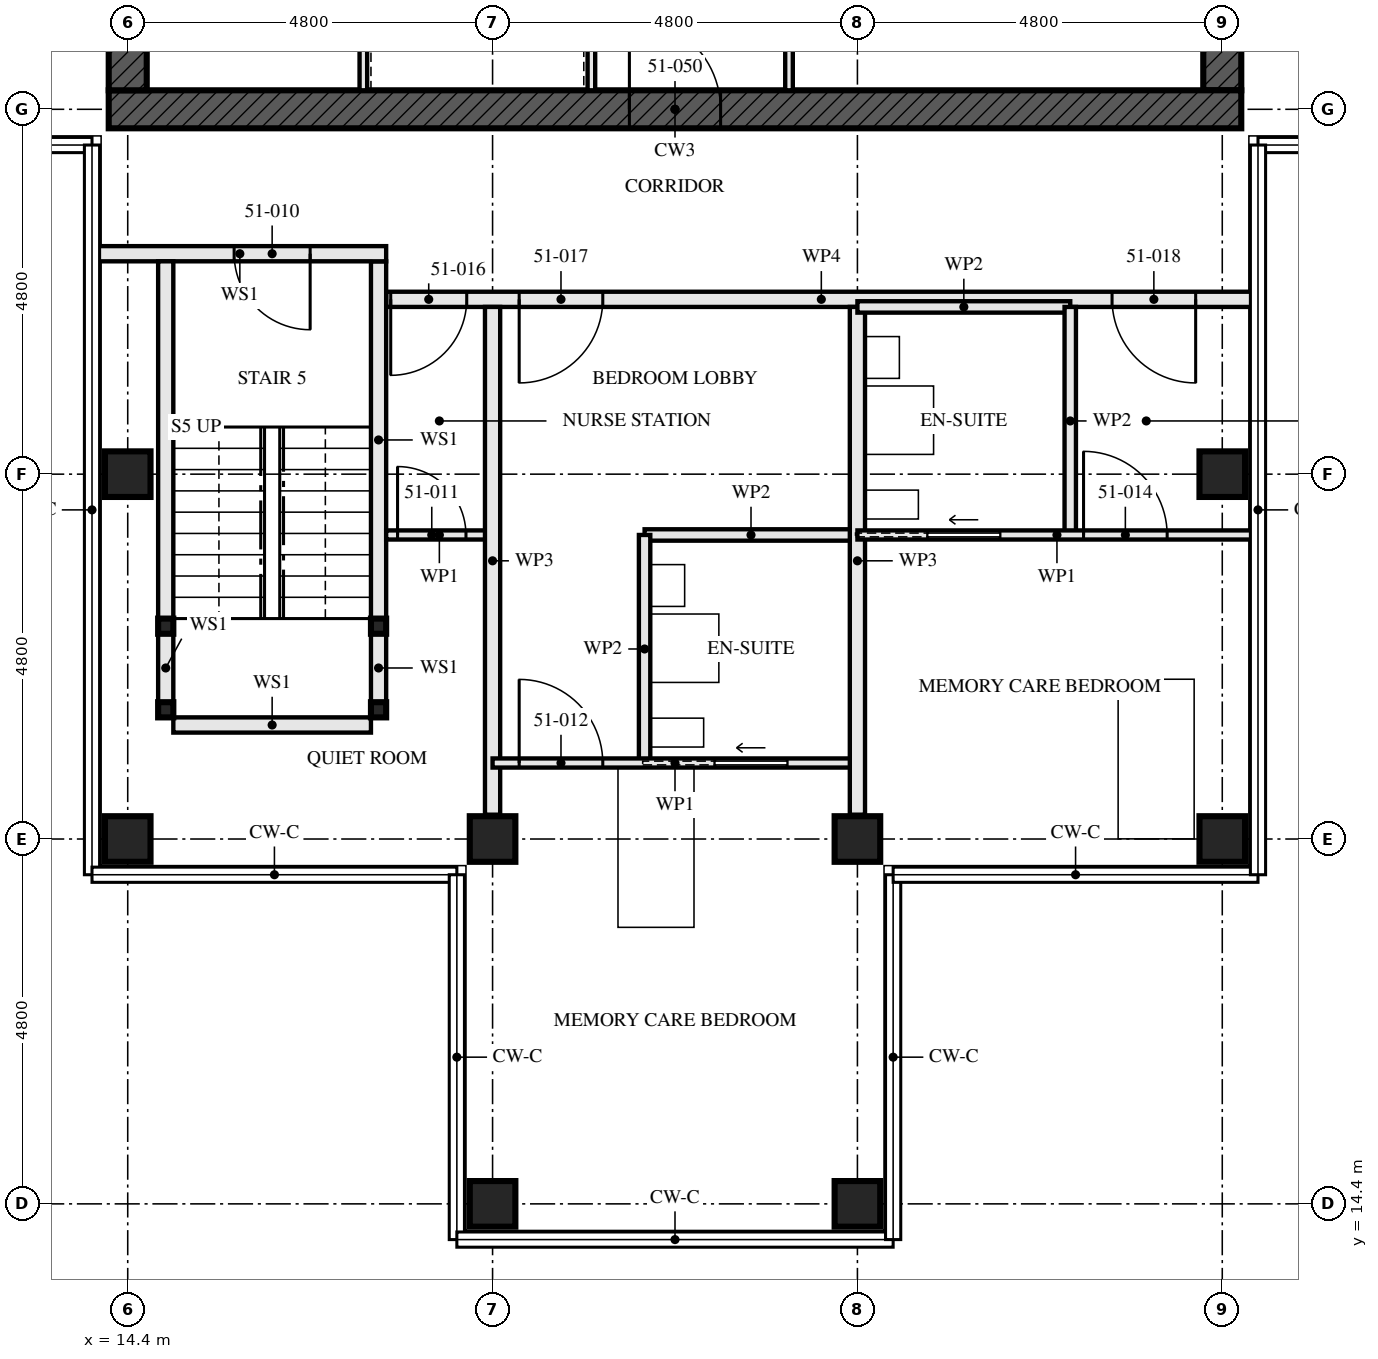
"""IFC4 building model, lengths in metres.
Left out: names, types, materials, properties, quantities, classifications, styles, units other than length and angle.
Written with IfcOpenShell. Run it as: python <this file> out.ifc"""

import sys

from ifc_helpers import new_model, si_unit, direction, frame, frame_2d, origin, origin_2d, place, context, subcontext, project, spatial, rectangle, hollow_rectangle, extrude, element, fill, save


model = new_model("IFC4")
c1 = context("Model", 3, precision=1e-05, world=origin(), true_north=direction((0.0, 1.0)))
c2 = subcontext(c1, "Body", "Model", "MODEL_VIEW")
j1 = project(units=[si_unit("LENGTHUNIT", "METRE"), si_unit("PLANEANGLEUNIT", "RADIAN")], contexts=[c1])
p1 = place(None, origin())
s1 = spatial("IfcSite", under=j1, at=p1, CompositionType="ELEMENT")
p2 = place(p1, origin())
s2 = spatial("IfcBuilding", under=s1, at=p2, CompositionType="ELEMENT")
p3 = place(p2, frame((0.0, 0.0, 186.5)))
s3 = spatial("IfcBuildingStorey", under=s2, at=p3, CompositionType="ELEMENT", Elevation=186.5)
for number, where, z_axis, x_axis in (
    (1, (14.4, 19.2, 0.0), (0.0, 0.0, 1.0), (0.0, 1.0, 0.0)),
    (2, (14.4, 24.0, 0.0), (0.0, 0.0, 1.0), (1.0, 0.0, 0.0)),
    (3, (19.2, 14.4, 0.0), (0.0, 0.0, 1.0), (0.0, 1.0, 0.0)),
    (4, (19.2, 19.2, 0.0), (0.0, 0.0, 1.0), (0.0, 1.0, 0.0)),
    (5, (24.0, 14.4, 0.0), (0.0, 0.0, 1.0), (0.0, 1.0, 0.0)),
    (6, (24.0, 19.2, 0.0), (0.0, 0.0, 1.0), (0.0, 1.0, 0.0)),
    (7, (28.8, 19.2, 0.0), (0.0, 0.0, 1.0), (0.0, 1.0, 0.0)),
    (8, (28.8, 24.0, 0.0), (0.0, 0.0, 1.0), (1.0, 0.0, 0.0)),
):
    element("IfcColumn", number, at=place(p3, frame(where, z_axis=z_axis, x_axis=x_axis)), inside=s3, PredefinedType="COLUMN", context=c2, shape_type="SweptSolid", body=[
        extrude(hollow_rectangle(XDim=0.6, YDim=0.6, WallThickness=0.08, at=origin_2d()), origin(), (0.0, 0.0, 1.0), 3.5),
    ])
p4 = place(p3, frame((14.15, 28.8, -0.17), z_axis=(0.0, 0.0, 1.0), x_axis=(1.0, 0.0, 0.0)))
e9 = element("IfcWall", 9, at=p4, inside=s3, PredefinedType="SHEAR", context=c2, shape_type="SweptSolid", body=[
    extrude(rectangle(XDim=14.9, YDim=0.5, at=frame_2d((7.45, 0.0))), origin(), (0.0, 0.0, 1.0), 3.42),
])
p5 = place(p4, frame((6.85, 0.0, 0.17)))
e10 = element("IfcOpeningElement", 10, at=p5, cuts=e9, PredefinedType="OPENING", context=c2, shape_type="SweptSolid", body=[
    extrude(rectangle(XDim=1.2, YDim=2.1, at=frame_2d((0.6, 1.05))), frame((0.0, 0.26, 0.0), z_axis=(0.0, -1.0, 0.0), x_axis=(1.0, 0.0, 0.0)), (0.0, 0.0, 1.0), 0.521),
])
p6 = place(p3, frame((14.4, 42.95, -0.17), z_axis=(0.0, 0.0, 1.0), x_axis=(0.0, -1.0, 0.0)))
e11 = element("IfcWall", 11, at=p6, inside=s3, PredefinedType="SHEAR", context=c2, shape_type="SweptSolid", body=[
    extrude(rectangle(XDim=13.9, YDim=0.5, at=frame_2d((6.95, 0.0))), origin(), (0.0, 0.0, 1.0), 3.42),
])
p7 = place(p6, frame((6.35, 0.0, 0.17)))
e12 = element("IfcOpeningElement", 12, at=p7, cuts=e11, PredefinedType="OPENING", context=c2, shape_type="SweptSolid", body=[
    extrude(rectangle(XDim=1.2, YDim=2.1, at=frame_2d((0.6, 1.05))), frame((0.0, 0.26, 0.0), z_axis=(0.0, -1.0, 0.0), x_axis=(1.0, 0.0, 0.0)), (0.0, 0.0, 1.0), 0.521),
])
p8 = place(p3, frame((28.8, 29.05, -0.17), z_axis=(0.0, 0.0, 1.0), x_axis=(0.0, 1.0, 0.0)))
e13 = element("IfcWall", 13, at=p8, inside=s3, PredefinedType="SHEAR", context=c2, shape_type="SweptSolid", body=[
    extrude(rectangle(XDim=13.9, YDim=0.5, at=frame_2d((6.95, 0.0))), origin(), (0.0, 0.0, 1.0), 3.42),
])
p9 = place(p8, frame((6.35, 0.0, 0.17)))
e14 = element("IfcOpeningElement", 14, at=p9, cuts=e13, PredefinedType="OPENING", context=c2, shape_type="SweptSolid", body=[
    extrude(rectangle(XDim=1.2, YDim=2.1, at=frame_2d((0.6, 1.05))), frame((0.0, 0.26, 0.0), z_axis=(0.0, -1.0, 0.0), x_axis=(1.0, 0.0, 0.0)), (0.0, 0.0, 1.0), 0.521),
])
for number, where, z_axis, x_axis in (
    (15, (14.9, 20.9, 0.0), (0.0, 0.0, 1.0), (1.0, 0.0, 0.0)),
    (16, (17.7, 20.9, 0.0), (0.0, 0.0, 1.0), (1.0, 0.0, 0.0)),
    (17, (14.9, 22.0, 0.0), (0.0, 0.0, 1.0), (1.0, 0.0, 0.0)),
    (18, (17.7, 22.0, 0.0), (0.0, 0.0, 1.0), (1.0, 0.0, 0.0)),
):
    element("IfcColumn", number, at=place(p3, frame(where, z_axis=z_axis, x_axis=x_axis)), inside=s3, PredefinedType="COLUMN", context=c2, shape_type="SweptSolid", body=[
        extrude(hollow_rectangle(XDim=0.2, YDim=0.2, WallThickness=0.008, at=origin_2d()), origin(), (0.0, 0.0, 1.0), 3.25),
    ])
p10 = place(p3, frame((14.9, 21.0, 0.0), z_axis=(0.0, 0.0, 1.0), x_axis=(0.0, 1.0, 0.0)))
e19 = element("IfcWall", 19, at=p10, inside=s3, PredefinedType="SOLIDWALL", context=c2, shape_type="SweptSolid", body=[
    extrude(rectangle(XDim=0.9, YDim=0.2, at=frame_2d((0.45, 0.0))), origin(), (0.0, 0.0, 1.0), 2.94),
])
p11 = place(p3, frame((14.9, 22.1, 0.0), z_axis=(0.0, 0.0, 1.0), x_axis=(0.0, 1.0, 0.0)))
e20 = element("IfcWall", 20, at=p11, inside=s3, PredefinedType="SOLIDWALL", context=c2, shape_type="SweptSolid", body=[
    extrude(rectangle(XDim=4.7, YDim=0.2, at=frame_2d((2.35, 0.0))), origin(), (0.0, 0.0, 1.0), 2.94),
])
p12 = place(p3, frame((17.7, 21.0, 0.0), z_axis=(0.0, 0.0, 1.0), x_axis=(0.0, 1.0, 0.0)))
e21 = element("IfcWall", 21, at=p12, inside=s3, PredefinedType="SOLIDWALL", context=c2, shape_type="SweptSolid", body=[
    extrude(rectangle(XDim=0.9, YDim=0.2, at=frame_2d((0.45, 0.0))), origin(), (0.0, 0.0, 1.0), 2.94),
])
p13 = place(p3, frame((17.7, 22.1, 0.0), z_axis=(0.0, 0.0, 1.0), x_axis=(0.0, 1.0, 0.0)))
e22 = element("IfcWall", 22, at=p13, inside=s3, PredefinedType="SOLIDWALL", context=c2, shape_type="SweptSolid", body=[
    extrude(rectangle(XDim=4.7, YDim=0.2, at=frame_2d((2.35, 0.0))), origin(), (0.0, 0.0, 1.0), 2.94),
])
p14 = place(p3, frame((15.0, 20.7, 0.0), z_axis=(0.0, 0.0, 1.0), x_axis=(1.0, 0.0, 0.0)))
e23 = element("IfcWall", 23, at=p14, inside=s3, PredefinedType="SOLIDWALL", context=c2, shape_type="SweptSolid", body=[
    extrude(rectangle(XDim=2.6, YDim=0.2, at=frame_2d((1.3, 0.0))), origin(), (0.0, 0.0, 1.0), 3.25),
])
p15 = place(p3, frame((13.95, 26.9, 0.0), z_axis=(0.0, 0.0, 1.0), x_axis=(1.0, 0.0, 0.0)))
e24 = element("IfcWall", 24, at=p15, inside=s3, PredefinedType="SOLIDWALL", context=c2, shape_type="SweptSolid", body=[
    extrude(rectangle(XDim=3.85, YDim=0.2, at=frame_2d((1.925, 0.0))), origin(), (0.0, 0.0, 1.0), 2.04),
])
p16 = place(p15, frame((1.85, 0.0, 0.0)))
e25 = element("IfcOpeningElement", 25, at=p16, cuts=e24, PredefinedType="OPENING", context=c2, shape_type="SweptSolid", body=[
    extrude(rectangle(XDim=1.0, YDim=2.0, at=frame_2d((0.5, 1.0))), frame((0.0, 0.111, 0.0), z_axis=(0.0, -1.0, 0.0), x_axis=(1.0, 0.0, 0.0)), (0.0, 0.0, 1.0), 0.221),
])
p17 = place(p3, frame((17.8, 23.2, 0.0), z_axis=(0.0, 0.0, 1.0), x_axis=(1.0, 0.0, 0.0)))
e26 = element("IfcWall", 26, at=p17, inside=s3, PredefinedType="PARTITIONING", context=c2, shape_type="SweptSolid", body=[
    extrude(rectangle(XDim=1.4, YDim=0.12, at=frame_2d((0.7, 0.0))), origin(), (0.0, 0.0, 1.0), 3.25),
])
p18 = place(p17, frame((0.15, 0.0, 0.0)))
e27 = element("IfcOpeningElement", 27, at=p18, cuts=e26, PredefinedType="OPENING", context=c2, shape_type="SweptSolid", body=[
    extrude(rectangle(XDim=0.9, YDim=2.1, at=frame_2d((0.45, 1.05))), frame((0.0, 0.071, 0.0), z_axis=(0.0, -1.0, 0.0), x_axis=(1.0, 0.0, 0.0)), (0.0, 0.0, 1.0), 0.141),
])
p19 = place(p3, frame((19.2, 19.52, 0.0), z_axis=(0.0, 0.0, 1.0), x_axis=(0.0, 1.0, 0.0)))
e28 = element("IfcWall", 28, at=p19, inside=s3, PredefinedType="PARTITIONING", context=c2, shape_type="SweptSolid", body=[
    extrude(rectangle(XDim=6.68, YDim=0.2, at=frame_2d((3.34, 0.0))), origin(), (0.0, 0.0, 1.0), 2.04),
])
p20 = place(p3, frame((21.2, 20.2, 0.0), z_axis=(0.0, 0.0, 1.0), x_axis=(0.0, 1.0, 0.0)))
e29 = element("IfcWall", 29, at=p20, inside=s3, PredefinedType="PARTITIONING", context=c2, shape_type="SweptSolid", body=[
    extrude(rectangle(XDim=3.0, YDim=0.15, at=frame_2d((1.5, 0.0))), origin(), (0.0, 0.0, 1.0), 3.25),
])
p21 = place(p3, frame((21.2, 23.2, 0.0), z_axis=(0.0, 0.0, 1.0), x_axis=(1.0, 0.0, 0.0)))
e30 = element("IfcWall", 30, at=p21, inside=s3, PredefinedType="PARTITIONING", context=c2, shape_type="SweptSolid", body=[
    extrude(rectangle(XDim=2.8, YDim=0.15, at=frame_2d((1.4, 0.0))), origin(), (0.0, 0.0, 1.0), 3.25),
])
p22 = place(p3, frame((19.2, 20.2, 0.0), z_axis=(0.0, 0.0, 1.0), x_axis=(1.0, 0.0, 0.0)))
e31 = element("IfcWall", 31, at=p22, inside=s3, PredefinedType="PARTITIONING", context=c2, shape_type="SweptSolid", body=[
    extrude(rectangle(XDim=4.8, YDim=0.12, at=frame_2d((2.4, 0.0))), origin(), (0.0, 0.0, 1.0), 3.25),
])
p23 = place(p22, frame((0.35, 0.0, 0.0)))
e32 = element("IfcOpeningElement", 32, at=p23, cuts=e31, PredefinedType="OPENING", context=c2, shape_type="SweptSolid", body=[
    extrude(rectangle(XDim=1.1, YDim=2.1, at=frame_2d((0.55, 1.05))), frame((0.0, 0.071, 0.0), z_axis=(0.0, -1.0, 0.0), x_axis=(1.0, 0.0, 0.0)), (0.0, 0.0, 1.0), 0.141),
])
p24 = place(p22, frame((2.925, 0.0, 0.0)))
e33 = element("IfcOpeningElement", 33, at=p24, cuts=e31, PredefinedType="OPENING", context=c2, shape_type="SweptSolid", body=[
    extrude(rectangle(XDim=0.95, YDim=2.1, at=frame_2d((0.475, 1.05))), frame((0.0, 0.071, 0.0), z_axis=(0.0, -1.0, 0.0), x_axis=(1.0, 0.0, 0.0)), (0.0, 0.0, 1.0), 0.141),
])
p25 = place(p3, frame((24.0, 19.52, 0.0), z_axis=(0.0, 0.0, 1.0), x_axis=(0.0, 1.0, 0.0)))
e34 = element("IfcWall", 34, at=p25, inside=s3, PredefinedType="PARTITIONING", context=c2, shape_type="SweptSolid", body=[
    extrude(rectangle(XDim=6.68, YDim=0.2, at=frame_2d((3.34, 0.0))), origin(), (0.0, 0.0, 1.0), 2.04),
])
p26 = place(p3, frame((26.8, 23.2, 0.0), z_axis=(0.0, 0.0, 1.0), x_axis=(0.0, 1.0, 0.0)))
e35 = element("IfcWall", 35, at=p26, inside=s3, PredefinedType="PARTITIONING", context=c2, shape_type="SweptSolid", body=[
    extrude(rectangle(XDim=3.0, YDim=0.15, at=frame_2d((1.5, 0.0))), origin(), (0.0, 0.0, 1.0), 2.04),
])
p27 = place(p3, frame((24.0, 26.2, 0.0), z_axis=(0.0, 0.0, 1.0), x_axis=(1.0, 0.0, 0.0)))
e36 = element("IfcWall", 36, at=p27, inside=s3, PredefinedType="PARTITIONING", context=c2, shape_type="SweptSolid", body=[
    extrude(rectangle(XDim=2.8, YDim=0.15, at=frame_2d((1.4, 0.0))), origin(), (0.0, 0.0, 1.0), 3.25),
])
p28 = place(p3, frame((24.0, 23.2, 0.0), z_axis=(0.0, 0.0, 1.0), x_axis=(1.0, 0.0, 0.0)))
e37 = element("IfcWall", 37, at=p28, inside=s3, PredefinedType="PARTITIONING", context=c2, shape_type="SweptSolid", body=[
    extrude(rectangle(XDim=5.25, YDim=0.12, at=frame_2d((2.625, 0.0))), origin(), (0.0, 0.0, 1.0), 2.04),
])
p29 = place(p28, frame((2.975, 0.0, 0.0)))
e38 = element("IfcOpeningElement", 38, at=p29, cuts=e37, PredefinedType="OPENING", context=c2, shape_type="SweptSolid", body=[
    extrude(rectangle(XDim=1.1, YDim=2.0, at=frame_2d((0.55, 1.0))), frame((0.0, 0.071, 0.0), z_axis=(0.0, -1.0, 0.0), x_axis=(1.0, 0.0, 0.0)), (0.0, 0.0, 1.0), 0.141),
])
p30 = place(p28, frame((0.925, 0.0, 0.0)))
e39 = element("IfcOpeningElement", 39, at=p30, cuts=e37, PredefinedType="OPENING", context=c2, shape_type="SweptSolid", body=[
    extrude(rectangle(XDim=0.95, YDim=2.0, at=frame_2d((0.475, 1.0))), frame((0.0, 0.071, 0.0), z_axis=(0.0, -1.0, 0.0), x_axis=(1.0, 0.0, 0.0)), (0.0, 0.0, 1.0), 0.141),
])
p31 = place(p3, frame((17.8, 26.3, 0.0), z_axis=(0.0, 0.0, 1.0), x_axis=(1.0, 0.0, 0.0)))
e40 = element("IfcWall", 40, at=p31, inside=s3, PredefinedType="PARTITIONING", context=c2, shape_type="SweptSolid", body=[
    extrude(rectangle(XDim=11.45, YDim=0.2, at=frame_2d((5.725, 0.0))), origin(), (0.0, 0.0, 1.0), 2.04),
])
p32 = place(p31, frame((0.06, 0.0, 0.0)))
e41 = element("IfcOpeningElement", 41, at=p32, cuts=e40, PredefinedType="OPENING", context=c2, shape_type="SweptSolid", body=[
    extrude(rectangle(XDim=1.0, YDim=2.0, at=frame_2d((0.5, 1.0))), frame((0.0, 0.111, 0.0), z_axis=(0.0, -1.0, 0.0), x_axis=(1.0, 0.0, 0.0)), (0.0, 0.0, 1.0), 0.221),
])
p33 = place(p31, frame((1.75, 0.0, 0.0)))
e42 = element("IfcOpeningElement", 42, at=p33, cuts=e40, PredefinedType="OPENING", context=c2, shape_type="SweptSolid", body=[
    extrude(rectangle(XDim=1.1, YDim=2.0, at=frame_2d((0.55, 1.0))), frame((0.0, 0.111, 0.0), z_axis=(0.0, -1.0, 0.0), x_axis=(1.0, 0.0, 0.0)), (0.0, 0.0, 1.0), 0.221),
])
p34 = place(p31, frame((9.55, 0.0, 0.0)))
e43 = element("IfcOpeningElement", 43, at=p34, cuts=e40, PredefinedType="OPENING", context=c2, shape_type="SweptSolid", body=[
    extrude(rectangle(XDim=1.1, YDim=2.0, at=frame_2d((0.55, 1.0))), frame((0.0, 0.111, 0.0), z_axis=(0.0, -1.0, 0.0), x_axis=(1.0, 0.0, 0.0)), (0.0, 0.0, 1.0), 0.221),
])
p35 = place(p3, frame((20.5, 29.05, 0.0), z_axis=(0.0, 0.0, 1.0), x_axis=(0.0, 1.0, 0.0)))
e44 = element("IfcWall", 44, at=p35, inside=s3, PredefinedType="SOLIDWALL", context=c2, shape_type="SweptSolid", body=[
    extrude(rectangle(XDim=5.8, YDim=0.1, at=frame_2d((2.9, 0.0))), origin(), (0.0, 0.0, 1.0), 3.25),
])
p36 = place(p35, frame((0.8, 0.0, 0.0)))
e45 = element("IfcOpeningElement", 45, at=p36, cuts=e44, PredefinedType="OPENING", context=c2, shape_type="SweptSolid", body=[
    extrude(rectangle(XDim=1.1, YDim=2.3, at=frame_2d((0.55, 1.15))), frame((0.0, 0.061, 0.0), z_axis=(0.0, -1.0, 0.0), x_axis=(1.0, 0.0, 0.0)), (0.0, 0.0, 1.0), 0.121),
])
p37 = place(p35, frame((3.775, 0.0, 0.0)))
e46 = element("IfcOpeningElement", 46, at=p37, cuts=e44, PredefinedType="OPENING", context=c2, shape_type="SweptSolid", body=[
    extrude(rectangle(XDim=1.1, YDim=2.3, at=frame_2d((0.55, 1.15))), frame((0.0, 0.061, 0.0), z_axis=(0.0, -1.0, 0.0), x_axis=(1.0, 0.0, 0.0)), (0.0, 0.0, 1.0), 0.121),
])
p38 = place(p3, frame((23.1, 29.05, 0.0), z_axis=(0.0, 0.0, 1.0), x_axis=(0.0, 1.0, 0.0)))
e47 = element("IfcWall", 47, at=p38, inside=s3, PredefinedType="SOLIDWALL", context=c2, shape_type="SweptSolid", body=[
    extrude(rectangle(XDim=5.8, YDim=0.1, at=frame_2d((2.9, 0.0))), origin(), (0.0, 0.0, 1.0), 3.25),
])
p39 = place(p38, frame((1.0, 0.0, 0.0)))
e48 = element("IfcOpeningElement", 48, at=p39, cuts=e47, PredefinedType="OPENING", context=c2, shape_type="SweptSolid", body=[
    extrude(rectangle(XDim=0.7, YDim=2.1, at=frame_2d((0.35, 1.05))), frame((0.0, 0.061, 0.0), z_axis=(0.0, -1.0, 0.0), x_axis=(1.0, 0.0, 0.0)), (0.0, 0.0, 1.0), 0.121),
])
p40 = place(p3, frame((17.5, 29.05, 0.0), z_axis=(0.0, 0.0, 1.0), x_axis=(0.0, 1.0, 0.0)))
e49 = element("IfcWall", 49, at=p40, inside=s3, PredefinedType="SOLIDWALL", context=c2, shape_type="SweptSolid", body=[
    extrude(rectangle(XDim=5.8, YDim=0.1, at=frame_2d((2.9, 0.0))), origin(), (0.0, 0.0, 1.0), 3.25),
])
p41 = place(p16, frame((1.0, 0.0, 0.0), z_axis=(0.0, 0.0, 1.0), x_axis=(-1.0, 0.0, 0.0)))
e50 = element("IfcDoor", 50, at=p41, inside=s3, OperationType="SINGLE_SWING_RIGHT", PredefinedType="DOOR", context=c2, shape_type="SweptSolid", body=[
    extrude(rectangle(XDim=1.0, YDim=2.0, at=frame_2d((0.5, 1.0))), frame((0.0, 0.032, 0.0), z_axis=(0.0, -1.0, 0.0), x_axis=(1.0, 0.0, 0.0)), (0.0, 0.0, 1.0), 0.064),
])
fill(e25, e50)
p42 = place(p18, origin())
e51 = element("IfcDoor", 51, at=p42, inside=s3, OperationType="SINGLE_SWING_RIGHT", PredefinedType="DOOR", context=c2, shape_type="SweptSolid", body=[
    extrude(rectangle(XDim=0.9, YDim=2.1, at=frame_2d((0.45, 1.05))), frame((0.0, 0.022, 0.0), z_axis=(0.0, -1.0, 0.0), x_axis=(1.0, 0.0, 0.0)), (0.0, 0.0, 1.0), 0.044),
])
fill(e27, e51)
p43 = place(p23, origin())
e52 = element("IfcDoor", 52, at=p43, inside=s3, OperationType="SINGLE_SWING_RIGHT", PredefinedType="DOOR", context=c2, shape_type="SweptSolid", body=[
    extrude(rectangle(XDim=1.1, YDim=2.1, at=frame_2d((0.55, 1.05))), frame((0.0, 0.022, 0.0), z_axis=(0.0, -1.0, 0.0), x_axis=(1.0, 0.0, 0.0)), (0.0, 0.0, 1.0), 0.044),
])
fill(e32, e52)
p44 = place(p24, origin())
e53 = element("IfcDoor", 53, at=p44, inside=s3, OperationType="SLIDING_TO_RIGHT", PredefinedType="DOOR", context=c2, shape_type="SweptSolid", body=[
    extrude(rectangle(XDim=0.95, YDim=2.1, at=frame_2d((0.475, 1.05))), frame((0.0, 0.022, 0.0), z_axis=(0.0, -1.0, 0.0), x_axis=(1.0, 0.0, 0.0)), (0.0, 0.0, 1.0), 0.044),
])
fill(e33, e53)
p45 = place(p29, origin())
e54 = element("IfcDoor", 54, at=p45, inside=s3, OperationType="SINGLE_SWING_RIGHT", PredefinedType="DOOR", context=c2, shape_type="SweptSolid", body=[
    extrude(rectangle(XDim=1.1, YDim=2.0, at=frame_2d((0.55, 1.0))), frame((0.0, 0.022, 0.0), z_axis=(0.0, -1.0, 0.0), x_axis=(1.0, 0.0, 0.0)), (0.0, 0.0, 1.0), 0.044),
])
fill(e38, e54)
p46 = place(p30, origin())
e55 = element("IfcDoor", 55, at=p46, inside=s3, OperationType="SLIDING_TO_RIGHT", PredefinedType="DOOR", context=c2, shape_type="SweptSolid", body=[
    extrude(rectangle(XDim=0.95, YDim=2.0, at=frame_2d((0.475, 1.0))), frame((0.0, 0.022, 0.0), z_axis=(0.0, -1.0, 0.0), x_axis=(1.0, 0.0, 0.0)), (0.0, 0.0, 1.0), 0.044),
])
fill(e39, e55)
p47 = place(p32, frame((1.0, 0.0, 0.0), z_axis=(0.0, 0.0, 1.0), x_axis=(-1.0, 0.0, 0.0)))
e56 = element("IfcDoor", 56, at=p47, inside=s3, OperationType="SINGLE_SWING_LEFT", PredefinedType="DOOR", context=c2, shape_type="SweptSolid", body=[
    extrude(rectangle(XDim=1.0, YDim=2.0, at=frame_2d((0.5, 1.0))), frame((0.0, 0.027, 0.0), z_axis=(0.0, -1.0, 0.0), x_axis=(1.0, 0.0, 0.0)), (0.0, 0.0, 1.0), 0.054),
])
fill(e41, e56)
p48 = place(p33, frame((1.1, 0.0, 0.0), z_axis=(0.0, 0.0, 1.0), x_axis=(-1.0, 0.0, 0.0)))
e57 = element("IfcDoor", 57, at=p48, inside=s3, OperationType="SINGLE_SWING_LEFT", PredefinedType="DOOR", context=c2, shape_type="SweptSolid", body=[
    extrude(rectangle(XDim=1.1, YDim=2.0, at=frame_2d((0.55, 1.0))), frame((0.0, 0.027, 0.0), z_axis=(0.0, -1.0, 0.0), x_axis=(1.0, 0.0, 0.0)), (0.0, 0.0, 1.0), 0.054),
])
fill(e42, e57)
p49 = place(p34, frame((1.1, 0.0, 0.0), z_axis=(0.0, 0.0, 1.0), x_axis=(-1.0, 0.0, 0.0)))
e58 = element("IfcDoor", 58, at=p49, inside=s3, OperationType="SINGLE_SWING_RIGHT", PredefinedType="DOOR", context=c2, shape_type="SweptSolid", body=[
    extrude(rectangle(XDim=1.1, YDim=2.0, at=frame_2d((0.55, 1.0))), frame((0.0, 0.027, 0.0), z_axis=(0.0, -1.0, 0.0), x_axis=(1.0, 0.0, 0.0)), (0.0, 0.0, 1.0), 0.054),
])
fill(e43, e58)
p50 = place(p5, origin())
e59 = element("IfcDoor", 59, at=p50, inside=s3, OperationType="SINGLE_SWING_LEFT", PredefinedType="DOOR", context=c2, shape_type="SweptSolid", body=[
    extrude(rectangle(XDim=1.2, YDim=2.1, at=frame_2d((0.6, 1.05))), frame((0.0, 0.027, 0.0), z_axis=(0.0, -1.0, 0.0), x_axis=(1.0, 0.0, 0.0)), (0.0, 0.0, 1.0), 0.054),
])
fill(e10, e59)
save(model, sys.argv[1])
